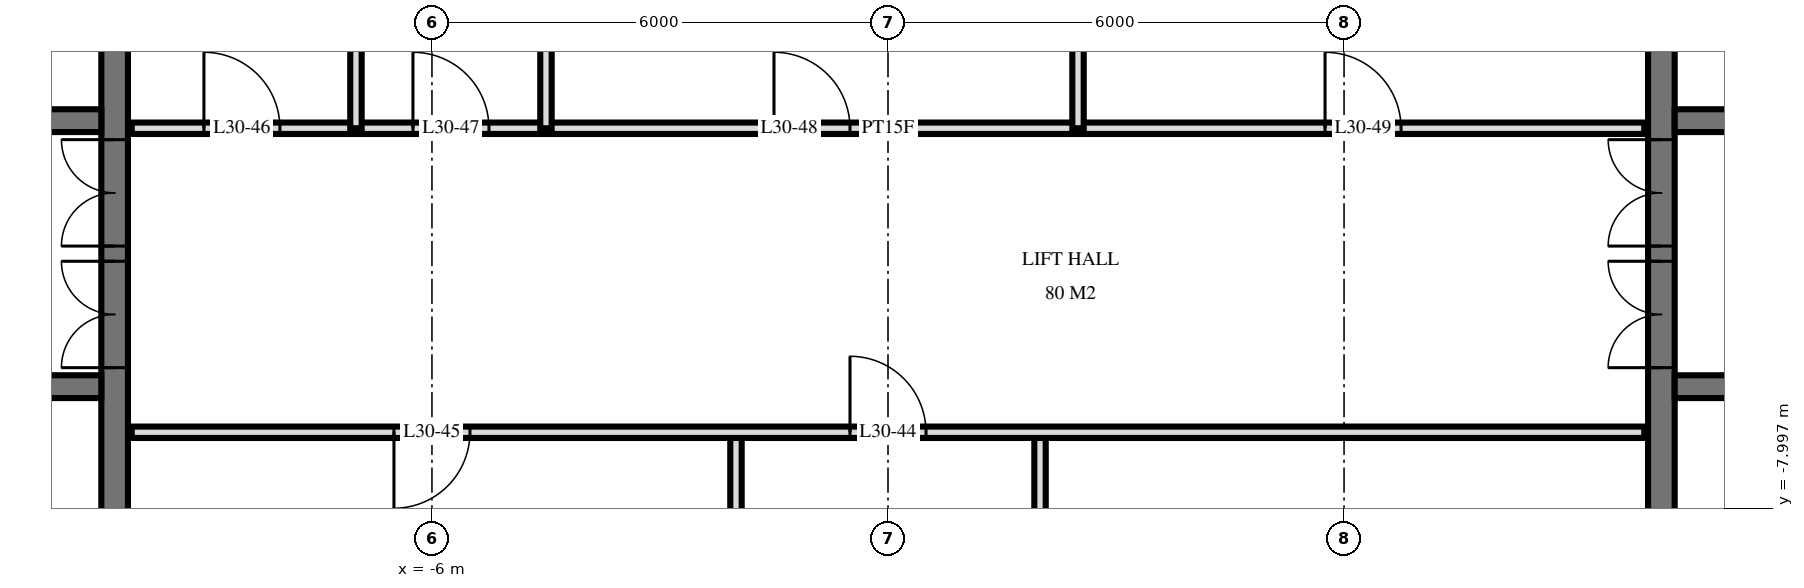
"""IFC4 building model, lengths in metres.
Left out: names, types, materials, properties, quantities, classifications, styles, units other than length and angle.
Written with IfcOpenShell. Run it as: python <this file> out.ifc"""

import sys

from ifc_helpers import new_model, si_unit, direction, frame, frame_2d, origin, place, context, subcontext, project, spatial, rectangle, extrude, element, fill, save


model = new_model("IFC4")
c1 = context("Model", 3, precision=1e-05, world=origin(), true_north=direction((0.0, 1.0)))
c2 = subcontext(c1, "Body", "Model", "MODEL_VIEW")
j1 = project(units=[si_unit("LENGTHUNIT", "METRE"), si_unit("PLANEANGLEUNIT", "RADIAN")], contexts=[c1])
p1 = place(None, origin())
s1 = spatial("IfcSite", under=j1, at=p1, CompositionType="ELEMENT")
p2 = place(p1, origin())
s2 = spatial("IfcBuilding", under=s1, at=p2, CompositionType="ELEMENT")
p3 = place(p2, frame((0.0, 0.0, 120.0)))
s3 = spatial("IfcBuildingStorey", under=s2, at=p3, CompositionType="ELEMENT", Elevation=120.0)
p4 = place(p3, frame((-10.175, -14.55, 0.0), z_axis=(0.0, 0.0, 1.0), x_axis=(0.0, 1.0, 0.0)))
e1 = element("IfcWall", 1, at=p4, inside=s3, PredefinedType="SHEAR", context=c2, shape_type="SweptSolid", body=[
    extrude(rectangle(XDim=14.1, YDim=0.35, at=frame_2d((7.05, 0.0))), origin(), (0.0, 0.0, 1.0), 3.6),
])
p5 = place(p4, frame((8.4, 0.0, 0.0)))
e2 = element("IfcOpeningElement", 2, at=p5, cuts=e1, PredefinedType="OPENING", context=c2, shape_type="SweptSolid", body=[
    extrude(rectangle(XDim=1.4, YDim=2.4, at=frame_2d((0.7, 1.2))), frame((0.0, 0.185, 0.0), z_axis=(0.0, -1.0, 0.0), x_axis=(1.0, 0.0, 0.0)), (0.0, 0.0, 1.0), 0.37),
])
p6 = place(p4, frame((10.0, 0.0, 0.0)))
e3 = element("IfcOpeningElement", 3, at=p6, cuts=e1, PredefinedType="OPENING", context=c2, shape_type="SweptSolid", body=[
    extrude(rectangle(XDim=1.4, YDim=2.4, at=frame_2d((0.7, 1.2))), frame((0.0, 0.185, 0.0), z_axis=(0.0, -1.0, 0.0), x_axis=(1.0, 0.0, 0.0)), (0.0, 0.0, 1.0), 0.37),
])
p7 = place(p4, frame((4.0, 0.0, 0.0)))
e4 = element("IfcOpeningElement", 4, at=p7, cuts=e1, PredefinedType="OPENING", context=c2, shape_type="SweptSolid", body=[
    extrude(rectangle(XDim=1.2, YDim=2.1, at=frame_2d((0.6, 1.05))), frame((0.0, 0.185, 0.0), z_axis=(0.0, -1.0, 0.0), x_axis=(1.0, 0.0, 0.0)), (0.0, 0.0, 1.0), 0.37),
])
p8 = place(p3, frame((-24.05, -2.9, 0.0), z_axis=(0.0, 0.0, 1.0), x_axis=(1.0, 0.0, 0.0)))
e5 = element("IfcWall", 5, at=p8, inside=s3, PredefinedType="SHEAR", context=c2, shape_type="SweptSolid", body=[
    extrude(rectangle(XDim=13.7, YDim=0.3, at=frame_2d((6.85, 0.0))), origin(), (0.0, 0.0, 1.0), 3.6),
])
p9 = place(p8, frame((0.55, 0.0, 0.0)))
e6 = element("IfcOpeningElement", 6, at=p9, cuts=e5, PredefinedType="OPENING", context=c2, shape_type="SweptSolid", body=[
    extrude(rectangle(XDim=1.1, YDim=2.1, at=frame_2d((0.55, 1.05))), frame((0.0, 0.16, 0.0), z_axis=(0.0, -1.0, 0.0), x_axis=(1.0, 0.0, 0.0)), (0.0, 0.0, 1.0), 0.32),
])
p10 = place(p8, frame((6.863, 0.0, 0.0)))
e7 = element("IfcOpeningElement", 7, at=p10, cuts=e5, PredefinedType="OPENING", context=c2, shape_type="SweptSolid", body=[
    extrude(rectangle(XDim=0.9, YDim=2.1, at=frame_2d((0.45, 1.05))), frame((0.0, 0.16, 0.0), z_axis=(0.0, -1.0, 0.0), x_axis=(1.0, 0.0, 0.0)), (0.0, 0.0, 1.0), 0.32),
])
p11 = place(p8, frame((5.438, 0.0, 0.0)))
e8 = element("IfcOpeningElement", 8, at=p11, cuts=e5, PredefinedType="OPENING", context=c2, shape_type="SweptSolid", body=[
    extrude(rectangle(XDim=0.9, YDim=2.1, at=frame_2d((0.45, 1.05))), frame((0.0, 0.16, 0.0), z_axis=(0.0, -1.0, 0.0), x_axis=(1.0, 0.0, 0.0)), (0.0, 0.0, 1.0), 0.32),
])
p12 = place(p8, frame((11.85, 0.0, 0.0)))
e9 = element("IfcOpeningElement", 9, at=p12, cuts=e5, PredefinedType="OPENING", context=c2, shape_type="SweptSolid", body=[
    extrude(rectangle(XDim=1.0, YDim=2.1, at=frame_2d((0.5, 1.05))), frame((0.0, 0.16, 0.0), z_axis=(0.0, -1.0, 0.0), x_axis=(1.0, 0.0, 0.0)), (0.0, 0.0, 1.0), 0.32),
])
p13 = place(p8, frame((9.562, 0.0, 0.0)))
e10 = element("IfcOpeningElement", 10, at=p13, cuts=e5, PredefinedType="OPENING", context=c2, shape_type="SweptSolid", body=[
    extrude(rectangle(XDim=1.0, YDim=2.1, at=frame_2d((0.5, 1.05))), frame((0.0, 0.16, 0.0), z_axis=(0.0, -1.0, 0.0), x_axis=(1.0, 0.0, 0.0)), (0.0, 0.0, 1.0), 0.32),
])
p14 = place(p8, frame((8.137, 0.0, 0.0)))
e11 = element("IfcOpeningElement", 11, at=p14, cuts=e5, PredefinedType="OPENING", context=c2, shape_type="SweptSolid", body=[
    extrude(rectangle(XDim=1.0, YDim=2.1, at=frame_2d((0.5, 1.05))), frame((0.0, 0.16, 0.0), z_axis=(0.0, -1.0, 0.0), x_axis=(1.0, 0.0, 0.0)), (0.0, 0.0, 1.0), 0.32),
])
p15 = place(p8, frame((3.0, 0.0, 0.0)))
e12 = element("IfcOpeningElement", 12, at=p15, cuts=e5, PredefinedType="OPENING", context=c2, shape_type="SweptSolid", body=[
    extrude(rectangle(XDim=1.0, YDim=2.1, at=frame_2d((0.5, 1.05))), frame((0.0, 0.16, 0.0), z_axis=(0.0, -1.0, 0.0), x_axis=(1.0, 0.0, 0.0)), (0.0, 0.0, 1.0), 0.32),
])
p16 = place(p3, frame((-24.05, -6.4, 0.0), z_axis=(0.0, 0.0, 1.0), x_axis=(1.0, 0.0, 0.0)))
e13 = element("IfcWall", 13, at=p16, inside=s3, PredefinedType="SHEAR", context=c2, shape_type="SweptSolid", body=[
    extrude(rectangle(XDim=13.7, YDim=0.3, at=frame_2d((6.85, 0.0))), origin(), (0.0, 0.0, 1.0), 3.6),
])
p17 = place(p16, frame((0.55, 0.0, 0.0)))
e14 = element("IfcOpeningElement", 14, at=p17, cuts=e13, PredefinedType="OPENING", context=c2, shape_type="SweptSolid", body=[
    extrude(rectangle(XDim=1.1, YDim=2.1, at=frame_2d((0.55, 1.05))), frame((0.0, 0.16, 0.0), z_axis=(0.0, -1.0, 0.0), x_axis=(1.0, 0.0, 0.0)), (0.0, 0.0, 1.0), 0.32),
])
p18 = place(p16, frame((5.8, 0.0, 0.0)))
e15 = element("IfcOpeningElement", 15, at=p18, cuts=e13, PredefinedType="OPENING", context=c2, shape_type="SweptSolid", body=[
    extrude(rectangle(XDim=1.1, YDim=2.1, at=frame_2d((0.55, 1.05))), frame((0.0, 0.16, 0.0), z_axis=(0.0, -1.0, 0.0), x_axis=(1.0, 0.0, 0.0)), (0.0, 0.0, 1.0), 0.32),
])
p19 = place(p3, frame((10.175, -14.55, 0.0), z_axis=(0.0, 0.0, 1.0), x_axis=(0.0, 1.0, 0.0)))
e16 = element("IfcWall", 16, at=p19, inside=s3, PredefinedType="SHEAR", context=c2, shape_type="SweptSolid", body=[
    extrude(rectangle(XDim=14.1, YDim=0.35, at=frame_2d((7.05, 0.0))), origin(), (0.0, 0.0, 1.0), 3.6),
])
p20 = place(p19, frame((8.4, 0.0, 0.0)))
e17 = element("IfcOpeningElement", 17, at=p20, cuts=e16, PredefinedType="OPENING", context=c2, shape_type="SweptSolid", body=[
    extrude(rectangle(XDim=1.4, YDim=2.4, at=frame_2d((0.7, 1.2))), frame((0.0, 0.185, 0.0), z_axis=(0.0, -1.0, 0.0), x_axis=(1.0, 0.0, 0.0)), (0.0, 0.0, 1.0), 0.37),
])
p21 = place(p19, frame((10.0, 0.0, 0.0)))
e18 = element("IfcOpeningElement", 18, at=p21, cuts=e16, PredefinedType="OPENING", context=c2, shape_type="SweptSolid", body=[
    extrude(rectangle(XDim=1.4, YDim=2.4, at=frame_2d((0.7, 1.2))), frame((0.0, 0.185, 0.0), z_axis=(0.0, -1.0, 0.0), x_axis=(1.0, 0.0, 0.0)), (0.0, 0.0, 1.0), 0.37),
])
p22 = place(p19, frame((4.0, 0.0, 0.0)))
e19 = element("IfcOpeningElement", 19, at=p22, cuts=e16, PredefinedType="OPENING", context=c2, shape_type="SweptSolid", body=[
    extrude(rectangle(XDim=1.2, YDim=2.1, at=frame_2d((0.6, 1.05))), frame((0.0, 0.185, 0.0), z_axis=(0.0, -1.0, 0.0), x_axis=(1.0, 0.0, 0.0)), (0.0, 0.0, 1.0), 0.37),
])
p23 = place(p3, frame((10.35, -2.9, 0.0), z_axis=(0.0, 0.0, 1.0), x_axis=(1.0, 0.0, 0.0)))
e20 = element("IfcWall", 20, at=p23, inside=s3, PredefinedType="SHEAR", context=c2, shape_type="SweptSolid", body=[
    extrude(rectangle(XDim=13.7, YDim=0.3, at=frame_2d((6.85, 0.0))), origin(), (0.0, 0.0, 1.0), 3.6),
])
p24 = place(p23, frame((12.05, 0.0, 0.0)))
e21 = element("IfcOpeningElement", 21, at=p24, cuts=e20, PredefinedType="OPENING", context=c2, shape_type="SweptSolid", body=[
    extrude(rectangle(XDim=1.1, YDim=2.1, at=frame_2d((0.55, 1.05))), frame((0.0, 0.16, 0.0), z_axis=(0.0, -1.0, 0.0), x_axis=(1.0, 0.0, 0.0)), (0.0, 0.0, 1.0), 0.32),
])
p25 = place(p23, frame((5.938, 0.0, 0.0)))
e22 = element("IfcOpeningElement", 22, at=p25, cuts=e20, PredefinedType="OPENING", context=c2, shape_type="SweptSolid", body=[
    extrude(rectangle(XDim=0.9, YDim=2.1, at=frame_2d((0.45, 1.05))), frame((0.0, 0.16, 0.0), z_axis=(0.0, -1.0, 0.0), x_axis=(1.0, 0.0, 0.0)), (0.0, 0.0, 1.0), 0.32),
])
p26 = place(p23, frame((7.363, 0.0, 0.0)))
e23 = element("IfcOpeningElement", 23, at=p26, cuts=e20, PredefinedType="OPENING", context=c2, shape_type="SweptSolid", body=[
    extrude(rectangle(XDim=0.9, YDim=2.1, at=frame_2d((0.45, 1.05))), frame((0.0, 0.16, 0.0), z_axis=(0.0, -1.0, 0.0), x_axis=(1.0, 0.0, 0.0)), (0.0, 0.0, 1.0), 0.32),
])
p27 = place(p23, frame((0.85, 0.0, 0.0)))
e24 = element("IfcOpeningElement", 24, at=p27, cuts=e20, PredefinedType="OPENING", context=c2, shape_type="SweptSolid", body=[
    extrude(rectangle(XDim=1.0, YDim=2.1, at=frame_2d((0.5, 1.05))), frame((0.0, 0.16, 0.0), z_axis=(0.0, -1.0, 0.0), x_axis=(1.0, 0.0, 0.0)), (0.0, 0.0, 1.0), 0.32),
])
p28 = place(p23, frame((3.137, 0.0, 0.0)))
e25 = element("IfcOpeningElement", 25, at=p28, cuts=e20, PredefinedType="OPENING", context=c2, shape_type="SweptSolid", body=[
    extrude(rectangle(XDim=1.0, YDim=2.1, at=frame_2d((0.5, 1.05))), frame((0.0, 0.16, 0.0), z_axis=(0.0, -1.0, 0.0), x_axis=(1.0, 0.0, 0.0)), (0.0, 0.0, 1.0), 0.32),
])
p29 = place(p23, frame((4.562, 0.0, 0.0)))
e26 = element("IfcOpeningElement", 26, at=p29, cuts=e20, PredefinedType="OPENING", context=c2, shape_type="SweptSolid", body=[
    extrude(rectangle(XDim=1.0, YDim=2.1, at=frame_2d((0.5, 1.05))), frame((0.0, 0.16, 0.0), z_axis=(0.0, -1.0, 0.0), x_axis=(1.0, 0.0, 0.0)), (0.0, 0.0, 1.0), 0.32),
])
p30 = place(p23, frame((9.7, 0.0, 0.0)))
e27 = element("IfcOpeningElement", 27, at=p30, cuts=e20, PredefinedType="OPENING", context=c2, shape_type="SweptSolid", body=[
    extrude(rectangle(XDim=1.0, YDim=2.1, at=frame_2d((0.5, 1.05))), frame((0.0, 0.16, 0.0), z_axis=(0.0, -1.0, 0.0), x_axis=(1.0, 0.0, 0.0)), (0.0, 0.0, 1.0), 0.32),
])
p31 = place(p3, frame((10.35, -6.4, 0.0), z_axis=(0.0, 0.0, 1.0), x_axis=(1.0, 0.0, 0.0)))
e28 = element("IfcWall", 28, at=p31, inside=s3, PredefinedType="SHEAR", context=c2, shape_type="SweptSolid", body=[
    extrude(rectangle(XDim=13.7, YDim=0.3, at=frame_2d((6.85, 0.0))), origin(), (0.0, 0.0, 1.0), 3.6),
])
p32 = place(p31, frame((12.05, 0.0, 0.0)))
e29 = element("IfcOpeningElement", 29, at=p32, cuts=e28, PredefinedType="OPENING", context=c2, shape_type="SweptSolid", body=[
    extrude(rectangle(XDim=1.1, YDim=2.1, at=frame_2d((0.55, 1.05))), frame((0.0, 0.16, 0.0), z_axis=(0.0, -1.0, 0.0), x_axis=(1.0, 0.0, 0.0)), (0.0, 0.0, 1.0), 0.32),
])
p33 = place(p31, frame((6.8, 0.0, 0.0)))
e30 = element("IfcOpeningElement", 30, at=p33, cuts=e28, PredefinedType="OPENING", context=c2, shape_type="SweptSolid", body=[
    extrude(rectangle(XDim=1.1, YDim=2.1, at=frame_2d((0.55, 1.05))), frame((0.0, 0.16, 0.0), z_axis=(0.0, -1.0, 0.0), x_axis=(1.0, 0.0, 0.0)), (0.0, 0.0, 1.0), 0.32),
])
p34 = place(p3, frame((2.5, -3.0, 0.0), z_axis=(0.0, 0.0, 1.0), x_axis=(0.0, 1.0, 0.0)))
e31 = element("IfcWall", 31, at=p34, inside=s3, PredefinedType="PARTITIONING", context=c2, shape_type="SweptSolid", body=[
    extrude(rectangle(XDim=4.02, YDim=0.15, at=frame_2d((2.01, 0.0))), origin(), (0.0, 0.0, 1.0), 3.32),
])
for number, where, z_axis, x_axis in (
    (32, (2.0, -11.0, 0.0), (0.0, 0.0, 1.0), (0.0, 1.0, 0.0)),
    (33, (-2.0, -11.0, 0.0), (0.0, 0.0, 1.0), (0.0, 1.0, 0.0)),
):
    element("IfcWall", number, at=place(p3, frame(where, z_axis=z_axis, x_axis=x_axis)), inside=s3, PredefinedType="PARTITIONING", context=c2, shape_type="SweptSolid", body=[
        extrude(rectangle(XDim=4.0, YDim=0.15, at=frame_2d((2.0, 0.0))), origin(), (0.0, 0.0, 1.0), 3.32),
    ])
for number, where, z_axis, x_axis in (
    (34, (-4.5, -3.0, 0.0), (0.0, 0.0, 1.0), (0.0, 1.0, 0.0)),
    (35, (-7.0, -3.0, 0.0), (0.0, 0.0, 1.0), (0.0, 1.0, 0.0)),
):
    element("IfcWall", number, at=place(p3, frame(where, z_axis=z_axis, x_axis=x_axis)), inside=s3, PredefinedType="PLUMBINGWALL", context=c2, shape_type="SweptSolid", body=[
        extrude(rectangle(XDim=4.02, YDim=0.15, at=frame_2d((2.01, 0.0))), origin(), (0.0, 0.0, 1.0), 3.32),
    ])
p35 = place(p3, frame((-9.95, -7.0, 0.0), z_axis=(0.0, 0.0, 1.0), x_axis=(1.0, 0.0, 0.0)))
e36 = element("IfcWall", 36, at=p35, inside=s3, PredefinedType="PARTITIONING", context=c2, shape_type="SweptSolid", body=[
    extrude(rectangle(XDim=19.9, YDim=0.15, at=frame_2d((9.95, 0.0))), origin(), (0.0, 0.0, 1.0), 3.32),
])
p36 = place(p35, frame((9.45, 0.0, 0.0)))
e37 = element("IfcOpeningElement", 37, at=p36, cuts=e36, PredefinedType="OPENING", context=c2, shape_type="SweptSolid", body=[
    extrude(rectangle(XDim=1.0, YDim=2.1, at=frame_2d((0.5, 1.05))), frame((0.0, 0.085, 0.0), z_axis=(0.0, -1.0, 0.0), x_axis=(1.0, 0.0, 0.0)), (0.0, 0.0, 1.0), 0.17),
])
p37 = place(p35, frame((3.45, 0.0, 0.0)))
e38 = element("IfcOpeningElement", 38, at=p37, cuts=e36, PredefinedType="OPENING", context=c2, shape_type="SweptSolid", body=[
    extrude(rectangle(XDim=1.0, YDim=2.1, at=frame_2d((0.5, 1.05))), frame((0.0, 0.085, 0.0), z_axis=(0.0, -1.0, 0.0), x_axis=(1.0, 0.0, 0.0)), (0.0, 0.0, 1.0), 0.17),
])
p38 = place(p3, frame((-9.95, -3.0, 0.0), z_axis=(0.0, 0.0, 1.0), x_axis=(1.0, 0.0, 0.0)))
e39 = element("IfcWall", 39, at=p38, inside=s3, PredefinedType="PARTITIONING", context=c2, shape_type="SweptSolid", body=[
    extrude(rectangle(XDim=19.9, YDim=0.15, at=frame_2d((9.95, 0.0))), origin(), (0.0, 0.0, 1.0), 3.32),
])
p39 = place(p38, frame((0.95, 0.0, 0.0)))
e40 = element("IfcOpeningElement", 40, at=p39, cuts=e39, PredefinedType="OPENING", context=c2, shape_type="SweptSolid", body=[
    extrude(rectangle(XDim=1.0, YDim=2.1, at=frame_2d((0.5, 1.05))), frame((0.0, 0.085, 0.0), z_axis=(0.0, -1.0, 0.0), x_axis=(1.0, 0.0, 0.0)), (0.0, 0.0, 1.0), 0.17),
])
p40 = place(p38, frame((3.7, 0.0, 0.0)))
e41 = element("IfcOpeningElement", 41, at=p40, cuts=e39, PredefinedType="OPENING", context=c2, shape_type="SweptSolid", body=[
    extrude(rectangle(XDim=1.0, YDim=2.1, at=frame_2d((0.5, 1.05))), frame((0.0, 0.085, 0.0), z_axis=(0.0, -1.0, 0.0), x_axis=(1.0, 0.0, 0.0)), (0.0, 0.0, 1.0), 0.17),
])
p41 = place(p38, frame((8.45, 0.0, 0.0)))
e42 = element("IfcOpeningElement", 42, at=p41, cuts=e39, PredefinedType="OPENING", context=c2, shape_type="SweptSolid", body=[
    extrude(rectangle(XDim=1.0, YDim=2.1, at=frame_2d((0.5, 1.05))), frame((0.0, 0.085, 0.0), z_axis=(0.0, -1.0, 0.0), x_axis=(1.0, 0.0, 0.0)), (0.0, 0.0, 1.0), 0.17),
])
p42 = place(p38, frame((15.7, 0.0, 0.0)))
e43 = element("IfcOpeningElement", 43, at=p42, cuts=e39, PredefinedType="OPENING", context=c2, shape_type="SweptSolid", body=[
    extrude(rectangle(XDim=1.0, YDim=2.1, at=frame_2d((0.5, 1.05))), frame((0.0, 0.085, 0.0), z_axis=(0.0, -1.0, 0.0), x_axis=(1.0, 0.0, 0.0)), (0.0, 0.0, 1.0), 0.17),
])
p43 = place(p5, origin())
e44 = element("IfcDoor", 44, at=p43, inside=s3, OperationType="DOUBLE_DOOR_SINGLE_SWING", PredefinedType="DOOR", context=c2, shape_type="SweptSolid", body=[
    extrude(rectangle(XDim=1.4, YDim=2.4, at=frame_2d((0.7, 1.2))), frame((0.0, 0.025, 0.0), z_axis=(0.0, -1.0, 0.0), x_axis=(1.0, 0.0, 0.0)), (0.0, 0.0, 1.0), 0.05),
])
fill(e2, e44)
p44 = place(p6, origin())
e45 = element("IfcDoor", 45, at=p44, inside=s3, OperationType="DOUBLE_DOOR_SINGLE_SWING", PredefinedType="DOOR", context=c2, shape_type="SweptSolid", body=[
    extrude(rectangle(XDim=1.4, YDim=2.4, at=frame_2d((0.7, 1.2))), frame((0.0, 0.025, 0.0), z_axis=(0.0, -1.0, 0.0), x_axis=(1.0, 0.0, 0.0)), (0.0, 0.0, 1.0), 0.05),
])
fill(e3, e45)
p45 = place(p20, origin())
e46 = element("IfcDoor", 46, at=p45, inside=s3, OperationType="DOUBLE_DOOR_SINGLE_SWING", PredefinedType="DOOR", context=c2, shape_type="SweptSolid", body=[
    extrude(rectangle(XDim=1.4, YDim=2.4, at=frame_2d((0.7, 1.2))), frame((0.0, 0.025, 0.0), z_axis=(0.0, -1.0, 0.0), x_axis=(1.0, 0.0, 0.0)), (0.0, 0.0, 1.0), 0.05),
])
fill(e17, e46)
p46 = place(p21, origin())
e47 = element("IfcDoor", 47, at=p46, inside=s3, OperationType="DOUBLE_DOOR_SINGLE_SWING", PredefinedType="DOOR", context=c2, shape_type="SweptSolid", body=[
    extrude(rectangle(XDim=1.4, YDim=2.4, at=frame_2d((0.7, 1.2))), frame((0.0, 0.025, 0.0), z_axis=(0.0, -1.0, 0.0), x_axis=(1.0, 0.0, 0.0)), (0.0, 0.0, 1.0), 0.05),
])
fill(e18, e47)
p47 = place(p36, origin())
e48 = element("IfcDoor", 48, at=p47, inside=s3, OperationType="SINGLE_SWING_RIGHT", PredefinedType="DOOR", context=c2, shape_type="SweptSolid", body=[
    extrude(rectangle(XDim=1.0, YDim=2.1, at=frame_2d((0.5, 1.05))), frame((0.0, 0.025, 0.0), z_axis=(0.0, -1.0, 0.0), x_axis=(1.0, 0.0, 0.0)), (0.0, 0.0, 1.0), 0.05),
])
fill(e37, e48)
p48 = place(p37, frame((0.5, 0.0, 0.0), z_axis=(0.0, 0.0, 1.0), x_axis=(-1.0, 0.0, 0.0)))
e49 = element("IfcDoor", 49, at=p48, inside=s3, OperationType="SINGLE_SWING_LEFT", PredefinedType="DOOR", context=c2, shape_type="SweptSolid", body=[
    extrude(rectangle(XDim=1.0, YDim=2.1, at=frame_2d((0.0, 1.05))), frame((0.0, -0.025, 0.0), z_axis=(0.0, 1.0, 0.0), x_axis=(-1.0, 0.0, 0.0)), (0.0, 0.0, 1.0), 0.05),
])
fill(e38, e49)
p49 = place(p39, origin())
e50 = element("IfcDoor", 50, at=p49, inside=s3, OperationType="SINGLE_SWING_RIGHT", PredefinedType="DOOR", context=c2, shape_type="SweptSolid", body=[
    extrude(rectangle(XDim=1.0, YDim=2.1, at=frame_2d((0.5, 1.05))), frame((0.0, 0.025, 0.0), z_axis=(0.0, -1.0, 0.0), x_axis=(1.0, 0.0, 0.0)), (0.0, 0.0, 1.0), 0.05),
])
fill(e40, e50)
p50 = place(p40, origin())
e51 = element("IfcDoor", 51, at=p50, inside=s3, OperationType="SINGLE_SWING_RIGHT", PredefinedType="DOOR", context=c2, shape_type="SweptSolid", body=[
    extrude(rectangle(XDim=1.0, YDim=2.1, at=frame_2d((0.5, 1.05))), frame((0.0, 0.025, 0.0), z_axis=(0.0, -1.0, 0.0), x_axis=(1.0, 0.0, 0.0)), (0.0, 0.0, 1.0), 0.05),
])
fill(e41, e51)
p51 = place(p41, origin())
e52 = element("IfcDoor", 52, at=p51, inside=s3, OperationType="SINGLE_SWING_RIGHT", PredefinedType="DOOR", context=c2, shape_type="SweptSolid", body=[
    extrude(rectangle(XDim=1.0, YDim=2.1, at=frame_2d((0.5, 1.05))), frame((0.0, 0.025, 0.0), z_axis=(0.0, -1.0, 0.0), x_axis=(1.0, 0.0, 0.0)), (0.0, 0.0, 1.0), 0.05),
])
fill(e42, e52)
p52 = place(p42, origin())
e53 = element("IfcDoor", 53, at=p52, inside=s3, OperationType="SINGLE_SWING_RIGHT", PredefinedType="DOOR", context=c2, shape_type="SweptSolid", body=[
    extrude(rectangle(XDim=1.0, YDim=2.1, at=frame_2d((0.5, 1.05))), frame((0.0, 0.025, 0.0), z_axis=(0.0, -1.0, 0.0), x_axis=(1.0, 0.0, 0.0)), (0.0, 0.0, 1.0), 0.05),
])
fill(e43, e53)
save(model, sys.argv[1])
